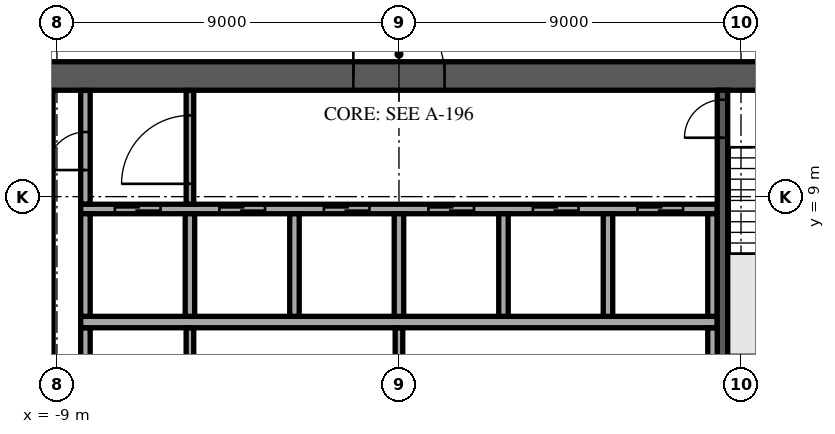
"""IFC4 building model, lengths in metres.
Left out: names, types, materials, properties, quantities, classifications, styles, units other than length and angle.
Written with IfcOpenShell. Run it as: python <this file> out.ifc"""

import sys

from ifc_helpers import new_model, si_unit, direction, frame, frame_2d, origin, place, context, subcontext, project, spatial, rectangle, extrude, element, fill, save


model = new_model("IFC4")
c1 = context("Model", 3, precision=1e-05, world=origin(), true_north=direction((0.0, 1.0)))
c2 = subcontext(c1, "Body", "Model", "MODEL_VIEW")
j1 = project(units=[si_unit("LENGTHUNIT", "METRE"), si_unit("PLANEANGLEUNIT", "RADIAN")], contexts=[c1])
p1 = place(None, origin())
s1 = spatial("IfcSite", under=j1, at=p1, CompositionType="ELEMENT")
p2 = place(p1, origin())
s2 = spatial("IfcBuilding", under=s1, at=p2, CompositionType="ELEMENT")
p3 = place(p2, frame((0.0, 0.0, 246.9)))
s3 = spatial("IfcBuildingStorey", under=s2, at=p3, CompositionType="ELEMENT", Elevation=246.9)
p4 = place(p3, frame((-12.55, 12.175, 0.0), z_axis=(0.0, 0.0, 1.0), x_axis=(1.0, 0.0, 0.0)))
e1 = element("IfcWall", 1, at=p4, inside=s3, PredefinedType="SHEAR", context=c2, shape_type="SweptSolid", body=[
    extrude(rectangle(XDim=25.1, YDim=0.75, at=frame_2d((12.55, 0.0))), origin(), (0.0, 0.0, 1.0), 3.64),
])
p5 = place(p4, frame((11.35, 0.0, 0.0)))
e2 = element("IfcOpeningElement", 2, at=p5, cuts=e1, PredefinedType="OPENING", context=c2, shape_type="SweptSolid", body=[
    extrude(rectangle(XDim=2.4, YDim=2.4, at=frame_2d((1.2, 1.2))), frame((0.0, 0.385, 0.0), z_axis=(0.0, -1.0, 0.0), x_axis=(1.0, 0.0, 0.0)), (0.0, 0.0, 1.0), 0.77),
])
p6 = place(p4, frame((22.175, 0.0, 0.0)))
e3 = element("IfcOpeningElement", 3, at=p6, cuts=e1, PredefinedType="OPENING", context=c2, shape_type="SweptSolid", body=[
    extrude(rectangle(XDim=1.2, YDim=2.1, at=frame_2d((0.6, 1.05))), frame((0.0, 0.385, 0.0), z_axis=(0.0, -1.0, 0.0), x_axis=(1.0, 0.0, 0.0)), (0.0, 0.0, 1.0), 0.77),
])
p7 = place(p4, frame((1.15, 0.0, 0.0)))
e4 = element("IfcOpeningElement", 4, at=p7, cuts=e1, PredefinedType="OPENING", context=c2, shape_type="SweptSolid", body=[
    extrude(rectangle(XDim=1.0, YDim=2.1, at=frame_2d((0.5, 1.05))), frame((0.0, 0.385, 0.0), z_axis=(0.0, -1.0, 0.0), x_axis=(1.0, 0.0, 0.0)), (0.0, 0.0, 1.0), 0.77),
])
p8 = place(p3, frame((-8.375, 5.7, 0.0), z_axis=(0.0, 0.0, 1.0), x_axis=(1.0, 0.0, 0.0)))
e5 = element("IfcWall", 5, at=p8, inside=s3, PredefinedType="SOLIDWALL", context=c2, shape_type="SweptSolid", body=[
    extrude(rectangle(XDim=16.75, YDim=0.3, at=frame_2d((8.375, 0.0))), origin(), (0.0, 0.0, 1.0), 3.64),
])
p9 = place(p3, frame((-8.375, 8.675, 0.0), z_axis=(0.0, 0.0, 1.0), x_axis=(1.0, 0.0, 0.0)))
e6 = element("IfcWall", 6, at=p9, inside=s3, PredefinedType="SOLIDWALL", context=c2, shape_type="SweptSolid", body=[
    extrude(rectangle(XDim=16.75, YDim=0.25, at=frame_2d((8.375, 0.0))), origin(), (0.0, 0.0, 1.0), 3.64),
])
p10 = place(p9, frame((0.9, 0.0, 0.0)))
e7 = element("IfcOpeningElement", 7, at=p10, cuts=e6, PredefinedType="OPENING", context=c2, shape_type="SweptSolid", body=[
    extrude(rectangle(XDim=1.2, YDim=2.1, at=frame_2d((0.6, 1.05))), frame((0.0, 0.135, 0.0), z_axis=(0.0, -1.0, 0.0), x_axis=(1.0, 0.0, 0.0)), (0.0, 0.0, 1.0), 0.27),
])
p11 = place(p9, frame((3.65, 0.0, 0.0)))
e8 = element("IfcOpeningElement", 8, at=p11, cuts=e6, PredefinedType="OPENING", context=c2, shape_type="SweptSolid", body=[
    extrude(rectangle(XDim=1.2, YDim=2.1, at=frame_2d((0.6, 1.05))), frame((0.0, 0.135, 0.0), z_axis=(0.0, -1.0, 0.0), x_axis=(1.0, 0.0, 0.0)), (0.0, 0.0, 1.0), 0.27),
])
p12 = place(p9, frame((6.4, 0.0, 0.0)))
e9 = element("IfcOpeningElement", 9, at=p12, cuts=e6, PredefinedType="OPENING", context=c2, shape_type="SweptSolid", body=[
    extrude(rectangle(XDim=1.2, YDim=2.1, at=frame_2d((0.6, 1.05))), frame((0.0, 0.135, 0.0), z_axis=(0.0, -1.0, 0.0), x_axis=(1.0, 0.0, 0.0)), (0.0, 0.0, 1.0), 0.27),
])
p13 = place(p9, frame((9.15, 0.0, 0.0)))
e10 = element("IfcOpeningElement", 10, at=p13, cuts=e6, PredefinedType="OPENING", context=c2, shape_type="SweptSolid", body=[
    extrude(rectangle(XDim=1.2, YDim=2.1, at=frame_2d((0.6, 1.05))), frame((0.0, 0.135, 0.0), z_axis=(0.0, -1.0, 0.0), x_axis=(1.0, 0.0, 0.0)), (0.0, 0.0, 1.0), 0.27),
])
p14 = place(p9, frame((11.9, 0.0, 0.0)))
e11 = element("IfcOpeningElement", 11, at=p14, cuts=e6, PredefinedType="OPENING", context=c2, shape_type="SweptSolid", body=[
    extrude(rectangle(XDim=1.2, YDim=2.1, at=frame_2d((0.6, 1.05))), frame((0.0, 0.135, 0.0), z_axis=(0.0, -1.0, 0.0), x_axis=(1.0, 0.0, 0.0)), (0.0, 0.0, 1.0), 0.27),
])
p15 = place(p9, frame((14.65, 0.0, 0.0)))
e12 = element("IfcOpeningElement", 12, at=p15, cuts=e6, PredefinedType="OPENING", context=c2, shape_type="SweptSolid", body=[
    extrude(rectangle(XDim=1.2, YDim=2.1, at=frame_2d((0.6, 1.05))), frame((0.0, 0.135, 0.0), z_axis=(0.0, -1.0, 0.0), x_axis=(1.0, 0.0, 0.0)), (0.0, 0.0, 1.0), 0.27),
])
for number, where, z_axis, x_axis in (
    (13, (-8.25, 5.85, 0.0), (0.0, 0.0, 1.0), (0.0, 1.0, 0.0)),
    (14, (-5.5, 5.85, 0.0), (0.0, 0.0, 1.0), (0.0, 1.0, 0.0)),
    (15, (-2.75, 5.85, 0.0), (0.0, 0.0, 1.0), (0.0, 1.0, 0.0)),
    (16, (0.0, 5.85, 0.0), (0.0, 0.0, 1.0), (0.0, 1.0, 0.0)),
    (17, (2.75, 5.85, 0.0), (0.0, 0.0, 1.0), (0.0, 1.0, 0.0)),
    (18, (5.5, 5.85, 0.0), (0.0, 0.0, 1.0), (0.0, 1.0, 0.0)),
    (19, (8.25, 5.85, 0.0), (0.0, 0.0, 1.0), (0.0, 1.0, 0.0)),
):
    element("IfcWall", number, at=place(p3, frame(where, z_axis=z_axis, x_axis=x_axis)), inside=s3, PredefinedType="SOLIDWALL", context=c2, shape_type="SweptSolid", body=[
        extrude(rectangle(XDim=2.7, YDim=0.25, at=frame_2d((1.35, 0.0))), origin(), (0.0, 0.0, 1.0), 3.64),
    ])
p16 = place(p3, frame((8.512, 4.55, 0.0), z_axis=(0.0, 0.0, 1.0), x_axis=(0.0, 1.0, 0.0)))
e20 = element("IfcWall", 20, at=p16, inside=s3, PredefinedType="SOLIDWALL", context=c2, shape_type="SweptSolid", body=[
    extrude(rectangle(XDim=7.25, YDim=0.275, at=frame_2d((3.625, 0.0))), origin(), (0.0, 0.0, 1.0), 3.64),
])
p17 = place(p16, frame((6.0, 0.0, 0.0)))
e21 = element("IfcOpeningElement", 21, at=p17, cuts=e20, PredefinedType="OPENING", context=c2, shape_type="SweptSolid", body=[
    extrude(rectangle(XDim=1.0, YDim=2.1, at=frame_2d((0.5, 1.05))), frame((0.0, 0.147, 0.0), z_axis=(0.0, -1.0, 0.0), x_axis=(1.0, 0.0, 0.0)), (0.0, 0.0, 1.0), 0.295),
])
for number, where, z_axis, x_axis in (
    (22, (-5.5, 2.855, 0.0), (0.0, 0.0, 1.0), (0.0, 1.0, 0.0)),
    (23, (0.0, 2.855, 0.0), (0.0, 0.0, 1.0), (0.0, 1.0, 0.0)),
):
    element("IfcWall", number, at=place(p3, frame(where, z_axis=z_axis, x_axis=x_axis)), inside=s3, PredefinedType="PARTITIONING", context=c2, shape_type="SweptSolid", body=[
        extrude(rectangle(XDim=2.69, YDim=0.2, at=frame_2d((1.345, 0.0))), origin(), (0.0, 0.0, 1.0), 3.64),
    ])
p18 = place(p3, frame((8.25, 2.855, 0.0), z_axis=(0.0, 0.0, 1.0), x_axis=(0.0, 1.0, 0.0)))
e24 = element("IfcWall", 24, at=p18, inside=s3, PredefinedType="PARTITIONING", context=c2, shape_type="SweptSolid", body=[
    extrude(rectangle(XDim=2.69, YDim=0.25, at=frame_2d((1.345, 0.0))), origin(), (0.0, 0.0, 1.0), 3.64),
])
p19 = place(p3, frame((-9.2, 4.78, 0.0), z_axis=(0.0, 0.0, 1.0), x_axis=(0.0, 1.0, 0.0)))
e25 = element("IfcWall", 25, at=p19, inside=s3, PredefinedType="PARTITIONING", context=c2, shape_type="SweptSolid", body=[
    extrude(rectangle(XDim=7.015, YDim=0.2, at=frame_2d((3.507, 0.0))), origin(), (0.0, 0.0, 1.0), 3.64),
])
p20 = place(p19, frame((2.92, 0.0, 0.0)))
e26 = element("IfcOpeningElement", 26, at=p20, cuts=e25, PredefinedType="OPENING", context=c2, shape_type="SweptSolid", body=[
    extrude(rectangle(XDim=1.0, YDim=2.1, at=frame_2d((0.5, 1.05))), frame((0.0, 0.11, 0.0), z_axis=(0.0, -1.0, 0.0), x_axis=(1.0, 0.0, 0.0)), (0.0, 0.0, 1.0), 0.22),
])
p21 = place(p3, frame((-8.25, 4.78, 0.0), z_axis=(0.0, 0.0, 1.0), x_axis=(0.0, 1.0, 0.0)))
e27 = element("IfcWall", 27, at=p21, inside=s3, PredefinedType="PARTITIONING", context=c2, shape_type="SweptSolid", body=[
    extrude(rectangle(XDim=0.765, YDim=0.25, at=frame_2d((0.382, 0.0))), origin(), (0.0, 0.0, 1.0), 3.64),
])
p22 = place(p3, frame((-8.25, 8.805, 0.0), z_axis=(0.0, 0.0, 1.0), x_axis=(0.0, 1.0, 0.0)))
e28 = element("IfcWall", 28, at=p22, inside=s3, PredefinedType="PARTITIONING", context=c2, shape_type="SweptSolid", body=[
    extrude(rectangle(XDim=2.99, YDim=0.25, at=frame_2d((1.495, 0.0))), origin(), (0.0, 0.0, 1.0), 3.64),
])
p23 = place(p22, frame((0.895, 0.0, 0.0)))
e29 = element("IfcOpeningElement", 29, at=p23, cuts=e28, PredefinedType="OPENING", context=c2, shape_type="SweptSolid", body=[
    extrude(rectangle(XDim=1.0, YDim=2.1, at=frame_2d((0.5, 1.05))), frame((0.0, 0.135, 0.0), z_axis=(0.0, -1.0, 0.0), x_axis=(1.0, 0.0, 0.0)), (0.0, 0.0, 1.0), 0.27),
])
p24 = place(p3, frame((-5.5, 8.805, 0.0), z_axis=(0.0, 0.0, 1.0), x_axis=(0.0, 1.0, 0.0)))
e30 = element("IfcWall", 30, at=p24, inside=s3, PredefinedType="PARTITIONING", context=c2, shape_type="SweptSolid", body=[
    extrude(rectangle(XDim=2.99, YDim=0.2, at=frame_2d((1.495, 0.0))), origin(), (0.0, 0.0, 1.0), 3.64),
])
p25 = place(p24, frame((0.532, 0.0, 0.0)))
e31 = element("IfcOpeningElement", 31, at=p25, cuts=e30, PredefinedType="OPENING", context=c2, shape_type="SweptSolid", body=[
    extrude(rectangle(XDim=1.8, YDim=2.1, at=frame_2d((0.9, 1.05))), frame((0.0, 0.11, 0.0), z_axis=(0.0, -1.0, 0.0), x_axis=(1.0, 0.0, 0.0)), (0.0, 0.0, 1.0), 0.22),
])
p26 = place(p3, frame((-5.115, 33.491, 0.0), z_axis=(0.0, 0.0, 1.0), x_axis=(-0.57357740375, -0.819151366908, 0.0)))
e32 = element("IfcWall", 32, at=p26, inside=s3, PredefinedType="STANDARD", context=c2, shape_type="SweptSolid", body=[
    extrude(rectangle(XDim=48.843, YDim=0.6, at=frame_2d((24.422, 0.0))), origin(), (0.0, 0.0, 1.0), 3.64),
])
p27 = place(p26, frame((1.22, 0.0, 0.9)))
e33 = element("IfcOpeningElement", 33, at=p27, cuts=e32, PredefinedType="OPENING", context=c2, shape_type="SweptSolid", body=[
    extrude(rectangle(XDim=2.0, YDim=2.1, at=frame_2d((1.0, 1.05))), frame((0.0, 0.31, 0.0), z_axis=(0.0, -1.0, 0.0), x_axis=(1.0, 0.0, 0.0)), (0.0, 0.0, 1.0), 0.62),
])
p28 = place(p26, frame((5.66, 0.0, 0.9)))
e34 = element("IfcOpeningElement", 34, at=p28, cuts=e32, PredefinedType="OPENING", context=c2, shape_type="SweptSolid", body=[
    extrude(rectangle(XDim=2.0, YDim=2.1, at=frame_2d((1.0, 1.05))), frame((0.0, 0.31, 0.0), z_axis=(0.0, -1.0, 0.0), x_axis=(1.0, 0.0, 0.0)), (0.0, 0.0, 1.0), 0.62),
])
p29 = place(p26, frame((10.101, 0.0, 0.9)))
e35 = element("IfcOpeningElement", 35, at=p29, cuts=e32, PredefinedType="OPENING", context=c2, shape_type="SweptSolid", body=[
    extrude(rectangle(XDim=2.0, YDim=2.1, at=frame_2d((1.0, 1.05))), frame((0.0, 0.31, 0.0), z_axis=(0.0, -1.0, 0.0), x_axis=(1.0, 0.0, 0.0)), (0.0, 0.0, 1.0), 0.62),
])
p30 = place(p26, frame((14.541, 0.0, 0.9)))
e36 = element("IfcOpeningElement", 36, at=p30, cuts=e32, PredefinedType="OPENING", context=c2, shape_type="SweptSolid", body=[
    extrude(rectangle(XDim=2.0, YDim=2.1, at=frame_2d((1.0, 1.05))), frame((0.0, 0.31, 0.0), z_axis=(0.0, -1.0, 0.0), x_axis=(1.0, 0.0, 0.0)), (0.0, 0.0, 1.0), 0.62),
])
p31 = place(p26, frame((18.981, 0.0, 0.9)))
e37 = element("IfcOpeningElement", 37, at=p31, cuts=e32, PredefinedType="OPENING", context=c2, shape_type="SweptSolid", body=[
    extrude(rectangle(XDim=2.0, YDim=2.1, at=frame_2d((1.0, 1.05))), frame((0.0, 0.31, 0.0), z_axis=(0.0, -1.0, 0.0), x_axis=(1.0, 0.0, 0.0)), (0.0, 0.0, 1.0), 0.62),
])
p32 = place(p26, frame((23.422, 0.0, 0.9)))
e38 = element("IfcOpeningElement", 38, at=p32, cuts=e32, PredefinedType="OPENING", context=c2, shape_type="SweptSolid", body=[
    extrude(rectangle(XDim=2.0, YDim=2.1, at=frame_2d((1.0, 1.05))), frame((0.0, 0.31, 0.0), z_axis=(0.0, -1.0, 0.0), x_axis=(1.0, 0.0, 0.0)), (0.0, 0.0, 1.0), 0.62),
])
p33 = place(p26, frame((27.862, 0.0, 0.9)))
e39 = element("IfcOpeningElement", 39, at=p33, cuts=e32, PredefinedType="OPENING", context=c2, shape_type="SweptSolid", body=[
    extrude(rectangle(XDim=2.0, YDim=2.1, at=frame_2d((1.0, 1.05))), frame((0.0, 0.31, 0.0), z_axis=(0.0, -1.0, 0.0), x_axis=(1.0, 0.0, 0.0)), (0.0, 0.0, 1.0), 0.62),
])
p34 = place(p26, frame((32.302, 0.0, 0.9)))
e40 = element("IfcOpeningElement", 40, at=p34, cuts=e32, PredefinedType="OPENING", context=c2, shape_type="SweptSolid", body=[
    extrude(rectangle(XDim=2.0, YDim=2.1, at=frame_2d((1.0, 1.05))), frame((0.0, 0.31, 0.0), z_axis=(0.0, -1.0, 0.0), x_axis=(1.0, 0.0, 0.0)), (0.0, 0.0, 1.0), 0.62),
])
p35 = place(p26, frame((36.742, 0.0, 0.9)))
e41 = element("IfcOpeningElement", 41, at=p35, cuts=e32, PredefinedType="OPENING", context=c2, shape_type="SweptSolid", body=[
    extrude(rectangle(XDim=2.0, YDim=2.1, at=frame_2d((1.0, 1.05))), frame((0.0, 0.31, 0.0), z_axis=(0.0, -1.0, 0.0), x_axis=(1.0, 0.0, 0.0)), (0.0, 0.0, 1.0), 0.62),
])
p36 = place(p26, frame((41.183, 0.0, 0.9)))
e42 = element("IfcOpeningElement", 42, at=p36, cuts=e32, PredefinedType="OPENING", context=c2, shape_type="SweptSolid", body=[
    extrude(rectangle(XDim=2.0, YDim=2.1, at=frame_2d((1.0, 1.05))), frame((0.0, 0.31, 0.0), z_axis=(0.0, -1.0, 0.0), x_axis=(1.0, 0.0, 0.0)), (0.0, 0.0, 1.0), 0.62),
])
p37 = place(p26, frame((45.623, 0.0, 0.9)))
e43 = element("IfcOpeningElement", 43, at=p37, cuts=e32, PredefinedType="OPENING", context=c2, shape_type="SweptSolid", body=[
    extrude(rectangle(XDim=2.0, YDim=2.1, at=frame_2d((1.0, 1.05))), frame((0.0, 0.31, 0.0), z_axis=(0.0, -1.0, 0.0), x_axis=(1.0, 0.0, 0.0)), (0.0, 0.0, 1.0), 0.62),
])
p38 = place(p3, frame((5.206, -33.362, 0.0), z_axis=(0.0, 0.0, 1.0), x_axis=(0.573577438409, 0.81915134264, 0.0)))
e44 = element("IfcWall", 44, at=p38, inside=s3, PredefinedType="STANDARD", context=c2, shape_type="SweptSolid", body=[
    extrude(rectangle(XDim=48.686, YDim=0.6, at=frame_2d((24.343, 0.0))), origin(), (0.0, 0.0, 1.0), 3.64),
])
p39 = place(p38, frame((1.213, 0.0, 0.9)))
e45 = element("IfcOpeningElement", 45, at=p39, cuts=e44, PredefinedType="OPENING", context=c2, shape_type="SweptSolid", body=[
    extrude(rectangle(XDim=2.0, YDim=2.1, at=frame_2d((1.0, 1.05))), frame((0.0, 0.31, 0.0), z_axis=(0.0, -1.0, 0.0), x_axis=(1.0, 0.0, 0.0)), (0.0, 0.0, 1.0), 0.62),
])
p40 = place(p38, frame((5.639, 0.0, 0.9)))
e46 = element("IfcOpeningElement", 46, at=p40, cuts=e44, PredefinedType="OPENING", context=c2, shape_type="SweptSolid", body=[
    extrude(rectangle(XDim=2.0, YDim=2.1, at=frame_2d((1.0, 1.05))), frame((0.0, 0.31, 0.0), z_axis=(0.0, -1.0, 0.0), x_axis=(1.0, 0.0, 0.0)), (0.0, 0.0, 1.0), 0.62),
])
p41 = place(p38, frame((10.065, 0.0, 0.9)))
e47 = element("IfcOpeningElement", 47, at=p41, cuts=e44, PredefinedType="OPENING", context=c2, shape_type="SweptSolid", body=[
    extrude(rectangle(XDim=2.0, YDim=2.1, at=frame_2d((1.0, 1.05))), frame((0.0, 0.31, 0.0), z_axis=(0.0, -1.0, 0.0), x_axis=(1.0, 0.0, 0.0)), (0.0, 0.0, 1.0), 0.62),
])
p42 = place(p38, frame((14.491, 0.0, 0.9)))
e48 = element("IfcOpeningElement", 48, at=p42, cuts=e44, PredefinedType="OPENING", context=c2, shape_type="SweptSolid", body=[
    extrude(rectangle(XDim=2.0, YDim=2.1, at=frame_2d((1.0, 1.05))), frame((0.0, 0.31, 0.0), z_axis=(0.0, -1.0, 0.0), x_axis=(1.0, 0.0, 0.0)), (0.0, 0.0, 1.0), 0.62),
])
p43 = place(p38, frame((18.917, 0.0, 0.9)))
e49 = element("IfcOpeningElement", 49, at=p43, cuts=e44, PredefinedType="OPENING", context=c2, shape_type="SweptSolid", body=[
    extrude(rectangle(XDim=2.0, YDim=2.1, at=frame_2d((1.0, 1.05))), frame((0.0, 0.31, 0.0), z_axis=(0.0, -1.0, 0.0), x_axis=(1.0, 0.0, 0.0)), (0.0, 0.0, 1.0), 0.62),
])
p44 = place(p38, frame((23.343, 0.0, 0.9)))
e50 = element("IfcOpeningElement", 50, at=p44, cuts=e44, PredefinedType="OPENING", context=c2, shape_type="SweptSolid", body=[
    extrude(rectangle(XDim=2.0, YDim=2.1, at=frame_2d((1.0, 1.05))), frame((0.0, 0.31, 0.0), z_axis=(0.0, -1.0, 0.0), x_axis=(1.0, 0.0, 0.0)), (0.0, 0.0, 1.0), 0.62),
])
p45 = place(p38, frame((27.769, 0.0, 0.9)))
e51 = element("IfcOpeningElement", 51, at=p45, cuts=e44, PredefinedType="OPENING", context=c2, shape_type="SweptSolid", body=[
    extrude(rectangle(XDim=2.0, YDim=2.1, at=frame_2d((1.0, 1.05))), frame((0.0, 0.31, 0.0), z_axis=(0.0, -1.0, 0.0), x_axis=(1.0, 0.0, 0.0)), (0.0, 0.0, 1.0), 0.62),
])
p46 = place(p38, frame((32.195, 0.0, 0.9)))
e52 = element("IfcOpeningElement", 52, at=p46, cuts=e44, PredefinedType="OPENING", context=c2, shape_type="SweptSolid", body=[
    extrude(rectangle(XDim=2.0, YDim=2.1, at=frame_2d((1.0, 1.05))), frame((0.0, 0.31, 0.0), z_axis=(0.0, -1.0, 0.0), x_axis=(1.0, 0.0, 0.0)), (0.0, 0.0, 1.0), 0.62),
])
p47 = place(p38, frame((36.621, 0.0, 0.9)))
e53 = element("IfcOpeningElement", 53, at=p47, cuts=e44, PredefinedType="OPENING", context=c2, shape_type="SweptSolid", body=[
    extrude(rectangle(XDim=2.0, YDim=2.1, at=frame_2d((1.0, 1.05))), frame((0.0, 0.31, 0.0), z_axis=(0.0, -1.0, 0.0), x_axis=(1.0, 0.0, 0.0)), (0.0, 0.0, 1.0), 0.62),
])
p48 = place(p38, frame((41.047, 0.0, 0.9)))
e54 = element("IfcOpeningElement", 54, at=p48, cuts=e44, PredefinedType="OPENING", context=c2, shape_type="SweptSolid", body=[
    extrude(rectangle(XDim=2.0, YDim=2.1, at=frame_2d((1.0, 1.05))), frame((0.0, 0.31, 0.0), z_axis=(0.0, -1.0, 0.0), x_axis=(1.0, 0.0, 0.0)), (0.0, 0.0, 1.0), 0.62),
])
p49 = place(p38, frame((45.473, 0.0, 0.9)))
e55 = element("IfcOpeningElement", 55, at=p49, cuts=e44, PredefinedType="OPENING", context=c2, shape_type="SweptSolid", body=[
    extrude(rectangle(XDim=2.0, YDim=2.1, at=frame_2d((1.0, 1.05))), frame((0.0, 0.31, 0.0), z_axis=(0.0, -1.0, 0.0), x_axis=(1.0, 0.0, 0.0)), (0.0, 0.0, 1.0), 0.62),
])
p50 = place(p3, frame((-1.89, 27.226, 0.0), z_axis=(0.0, 0.0, 1.0), x_axis=(0.819163235761, -0.573560452941, 0.0)))
e56 = element("IfcWall", 56, at=p50, inside=s3, PredefinedType="PARTITIONING", context=c2, shape_type="SweptSolid", body=[
    extrude(rectangle(XDim=34.403, YDim=0.15, at=frame_2d((17.202, 0.0))), origin(), (0.0, 0.0, 1.0), 3.24),
])
p51 = place(p50, frame((7.427, 0.0, 0.0)))
e57 = element("IfcOpeningElement", 57, at=p51, cuts=e56, PredefinedType="OPENING", context=c2, shape_type="SweptSolid", body=[
    extrude(rectangle(XDim=1.0, YDim=2.1, at=frame_2d((0.5, 1.05))), frame((0.0, 0.085, 0.0), z_axis=(0.0, -1.0, 0.0), x_axis=(1.0, 0.0, 0.0)), (0.0, 0.0, 1.0), 0.17),
])
p52 = place(p50, frame((15.173, 0.0, 0.0)))
e58 = element("IfcOpeningElement", 58, at=p52, cuts=e56, PredefinedType="OPENING", context=c2, shape_type="SweptSolid", body=[
    extrude(rectangle(XDim=1.0, YDim=2.1, at=frame_2d((0.5, 1.05))), frame((0.0, 0.085, 0.0), z_axis=(0.0, -1.0, 0.0), x_axis=(1.0, 0.0, 0.0)), (0.0, 0.0, 1.0), 0.17),
])
p53 = place(p50, frame((19.273, 0.0, 0.0)))
e59 = element("IfcOpeningElement", 59, at=p53, cuts=e56, PredefinedType="OPENING", context=c2, shape_type="SweptSolid", body=[
    extrude(rectangle(XDim=1.0, YDim=2.1, at=frame_2d((0.5, 1.05))), frame((0.0, 0.085, 0.0), z_axis=(0.0, -1.0, 0.0), x_axis=(1.0, 0.0, 0.0)), (0.0, 0.0, 1.0), 0.17),
])
p54 = place(p5, origin())
e60 = element("IfcDoor", 60, at=p54, inside=s3, OperationType="SINGLE_SWING_LEFT", PredefinedType="DOOR", context=c2, shape_type="SweptSolid", body=[
    extrude(rectangle(XDim=2.4, YDim=2.4, at=frame_2d((1.2, 1.2))), frame((0.0, 0.025, 0.0), z_axis=(0.0, -1.0, 0.0), x_axis=(1.0, 0.0, 0.0)), (0.0, 0.0, 1.0), 0.05),
])
fill(e2, e60)
p55 = place(p10, origin())
e61 = element("IfcDoor", 61, at=p55, inside=s3, OperationType="DOUBLE_DOOR_SLIDING", PredefinedType="DOOR", context=c2, shape_type="SweptSolid", body=[
    extrude(rectangle(XDim=1.2, YDim=2.1, at=frame_2d((0.6, 1.05))), frame((0.0, 0.025, 0.0), z_axis=(0.0, -1.0, 0.0), x_axis=(1.0, 0.0, 0.0)), (0.0, 0.0, 1.0), 0.05),
])
fill(e7, e61)
p56 = place(p11, origin())
e62 = element("IfcDoor", 62, at=p56, inside=s3, OperationType="DOUBLE_DOOR_SLIDING", PredefinedType="DOOR", context=c2, shape_type="SweptSolid", body=[
    extrude(rectangle(XDim=1.2, YDim=2.1, at=frame_2d((0.6, 1.05))), frame((0.0, 0.025, 0.0), z_axis=(0.0, -1.0, 0.0), x_axis=(1.0, 0.0, 0.0)), (0.0, 0.0, 1.0), 0.05),
])
fill(e8, e62)
p57 = place(p12, origin())
e63 = element("IfcDoor", 63, at=p57, inside=s3, OperationType="DOUBLE_DOOR_SLIDING", PredefinedType="DOOR", context=c2, shape_type="SweptSolid", body=[
    extrude(rectangle(XDim=1.2, YDim=2.1, at=frame_2d((0.6, 1.05))), frame((0.0, 0.025, 0.0), z_axis=(0.0, -1.0, 0.0), x_axis=(1.0, 0.0, 0.0)), (0.0, 0.0, 1.0), 0.05),
])
fill(e9, e63)
p58 = place(p13, origin())
e64 = element("IfcDoor", 64, at=p58, inside=s3, OperationType="DOUBLE_DOOR_SLIDING", PredefinedType="DOOR", context=c2, shape_type="SweptSolid", body=[
    extrude(rectangle(XDim=1.2, YDim=2.1, at=frame_2d((0.6, 1.05))), frame((0.0, 0.025, 0.0), z_axis=(0.0, -1.0, 0.0), x_axis=(1.0, 0.0, 0.0)), (0.0, 0.0, 1.0), 0.05),
])
fill(e10, e64)
p59 = place(p14, origin())
e65 = element("IfcDoor", 65, at=p59, inside=s3, OperationType="DOUBLE_DOOR_SLIDING", PredefinedType="DOOR", context=c2, shape_type="SweptSolid", body=[
    extrude(rectangle(XDim=1.2, YDim=2.1, at=frame_2d((0.6, 1.05))), frame((0.0, 0.025, 0.0), z_axis=(0.0, -1.0, 0.0), x_axis=(1.0, 0.0, 0.0)), (0.0, 0.0, 1.0), 0.05),
])
fill(e11, e65)
p60 = place(p15, origin())
e66 = element("IfcDoor", 66, at=p60, inside=s3, OperationType="DOUBLE_DOOR_SLIDING", PredefinedType="DOOR", context=c2, shape_type="SweptSolid", body=[
    extrude(rectangle(XDim=1.2, YDim=2.1, at=frame_2d((0.6, 1.05))), frame((0.0, 0.025, 0.0), z_axis=(0.0, -1.0, 0.0), x_axis=(1.0, 0.0, 0.0)), (0.0, 0.0, 1.0), 0.05),
])
fill(e12, e66)
p61 = place(p17, origin())
e67 = element("IfcDoor", 67, at=p61, inside=s3, OperationType="SINGLE_SWING_LEFT", PredefinedType="DOOR", context=c2, shape_type="SweptSolid", body=[
    extrude(rectangle(XDim=1.0, YDim=2.1, at=frame_2d((0.5, 1.05))), frame((0.0, 0.025, 0.0), z_axis=(0.0, -1.0, 0.0), x_axis=(1.0, 0.0, 0.0)), (0.0, 0.0, 1.0), 0.05),
])
fill(e21, e67)
p62 = place(p23, origin())
e68 = element("IfcDoor", 68, at=p62, inside=s3, OperationType="SINGLE_SWING_LEFT", PredefinedType="DOOR", context=c2, shape_type="SweptSolid", body=[
    extrude(rectangle(XDim=1.0, YDim=2.1, at=frame_2d((0.5, 1.05))), frame((0.0, 0.025, 0.0), z_axis=(0.0, -1.0, 0.0), x_axis=(1.0, 0.0, 0.0)), (0.0, 0.0, 1.0), 0.05),
])
fill(e29, e68)
p63 = place(p25, origin())
e69 = element("IfcDoor", 69, at=p63, inside=s3, OperationType="SINGLE_SWING_LEFT", PredefinedType="DOOR", context=c2, shape_type="SweptSolid", body=[
    extrude(rectangle(XDim=1.8, YDim=2.1, at=frame_2d((0.9, 1.05))), frame((0.0, 0.025, 0.0), z_axis=(0.0, -1.0, 0.0), x_axis=(1.0, 0.0, 0.0)), (0.0, 0.0, 1.0), 0.05),
])
fill(e31, e69)
save(model, sys.argv[1])
